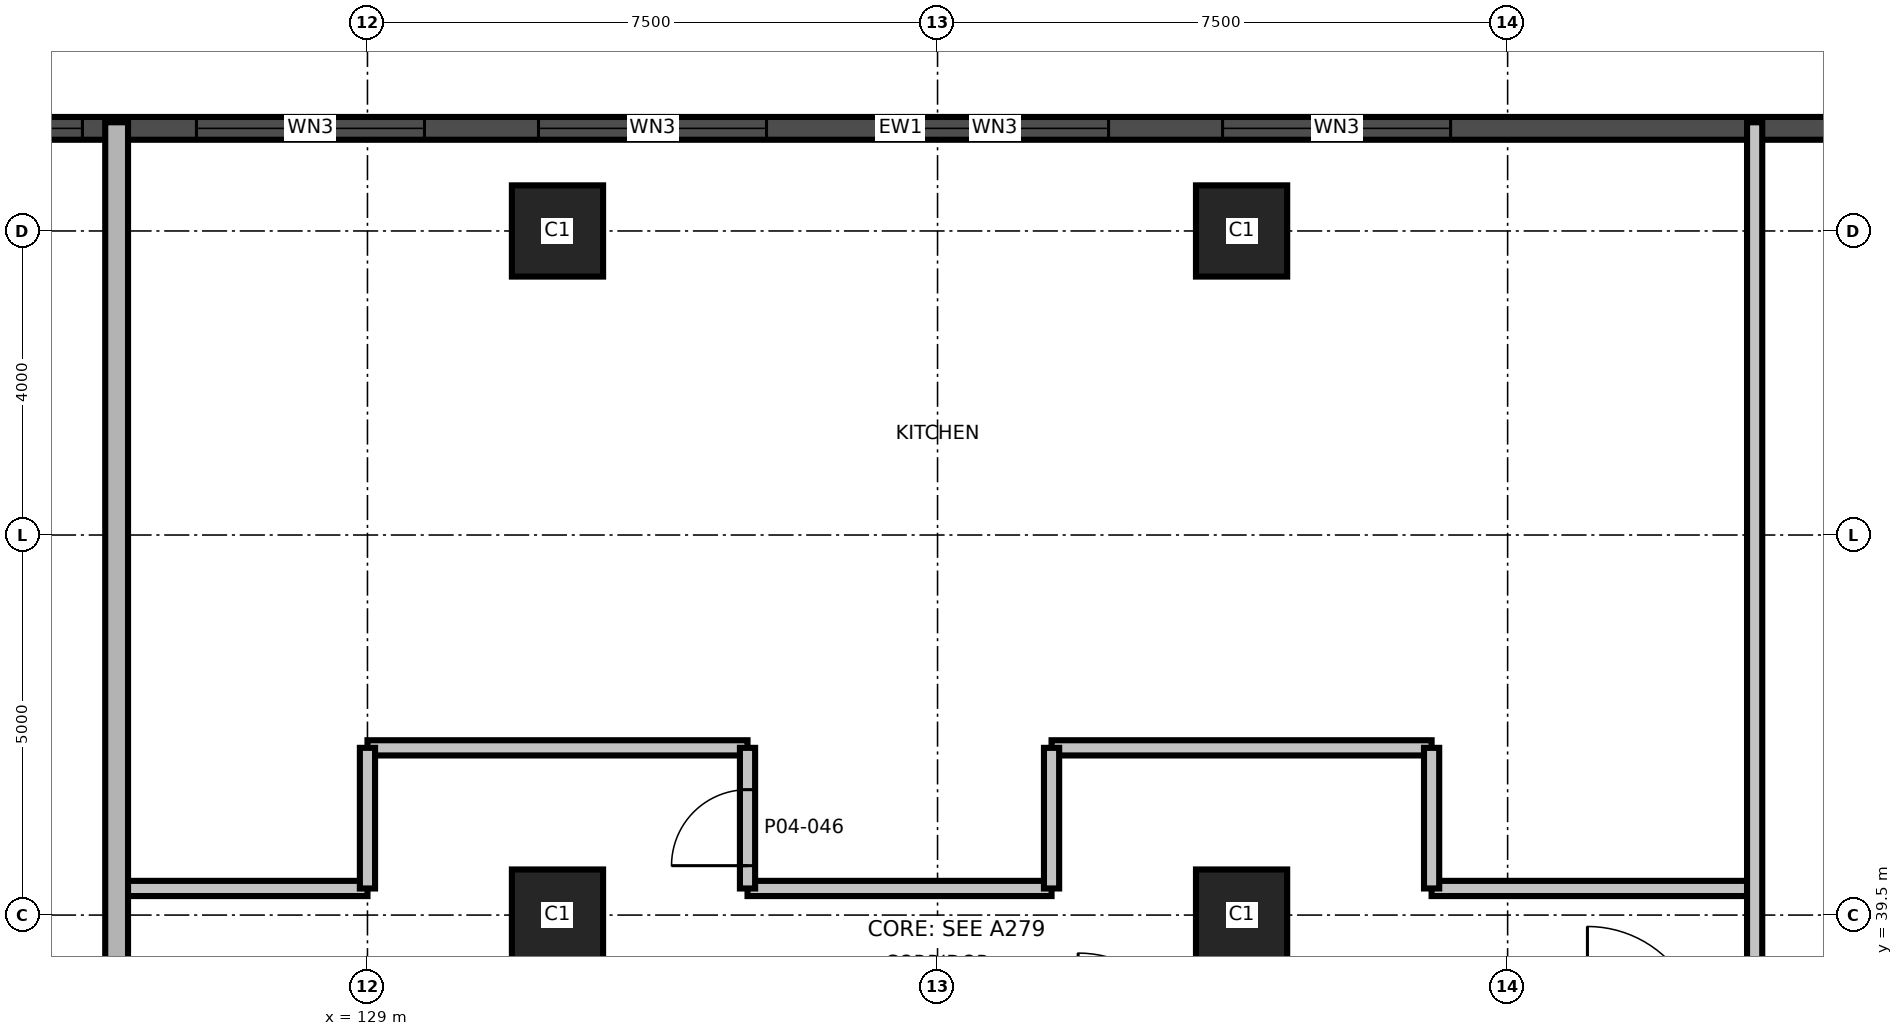
"""IFC4 building model, lengths in metres.
Left out: names, types, materials, properties, quantities, classifications, styles, units other than length and angle.
Written with IfcOpenShell. Run it as: python <this file> out.ifc"""

import sys

from ifc_helpers import new_model, si_unit, direction, frame, frame_2d, origin, origin_2d, place, context, subcontext, project, spatial, rectangle, extrude, element, fill, save


model = new_model("IFC4")
c1 = context("Model", 3, precision=1e-05, world=origin(), true_north=direction((0.0, 1.0)))
c2 = subcontext(c1, "Body", "Model", "MODEL_VIEW")
j1 = project(units=[si_unit("LENGTHUNIT", "METRE"), si_unit("PLANEANGLEUNIT", "RADIAN")], contexts=[c1])
p1 = place(None, origin())
s1 = spatial("IfcSite", under=j1, at=p1, CompositionType="ELEMENT")
p2 = place(p1, origin())
s2 = spatial("IfcBuilding", under=s1, at=p2, CompositionType="ELEMENT")
p3 = place(p2, frame((0.0, 0.0, 23.5)))
s3 = spatial("IfcBuildingStorey", under=s2, at=p3, CompositionType="ELEMENT", Elevation=23.5)
for number, where, z_axis, x_axis in (
    (1, (131.5, 39.5, 0.0), (0.0, 0.0, 1.0), (1.0, 0.0, 0.0)),
    (2, (140.5, 39.5, 0.0), (0.0, 0.0, 1.0), (1.0, 0.0, 0.0)),
    (3, (131.5, 48.5, 0.0), (0.0, 0.0, 1.0), (1.0, 0.0, 0.0)),
    (4, (140.5, 48.5, 0.0), (0.0, 0.0, 1.0), (1.0, 0.0, 0.0)),
):
    element("IfcColumn", number, at=place(p3, frame(where, z_axis=z_axis, x_axis=x_axis)), inside=s3, PredefinedType="COLUMN", context=c2, shape_type="SweptSolid", body=[
        extrude(rectangle(XDim=1.2, YDim=1.2, at=origin_2d()), origin(), (0.0, 0.0, 1.0), 5.0),
    ])
p4 = place(p3, frame((153.952, 49.85, 0.0), z_axis=(0.0, 0.0, 1.0), x_axis=(-1.0, 0.0, 0.0)))
e5 = element("IfcWall", 5, at=p4, inside=s3, PredefinedType="SOLIDWALL", context=c2, shape_type="SweptSolid", body=[
    extrude(rectangle(XDim=35.88, YDim=0.3, at=frame_2d((17.94, 0.0))), origin(), (0.0, 0.0, 1.0), 4.7),
])
p5 = place(p4, frame((1.226, 0.0, 0.9)))
e6 = element("IfcOpeningElement", 6, at=p5, cuts=e5, PredefinedType="OPENING", context=c2, shape_type="SweptSolid", body=[
    extrude(rectangle(XDim=3.0, YDim=2.4, at=frame_2d((1.5, 1.2))), frame((0.0, 0.16, 0.0), z_axis=(0.0, -1.0, 0.0), x_axis=(1.0, 0.0, 0.0)), (0.0, 0.0, 1.0), 0.32),
])
p6 = place(p4, frame((10.702, 0.0, 0.9)))
e7 = element("IfcOpeningElement", 7, at=p6, cuts=e5, PredefinedType="OPENING", context=c2, shape_type="SweptSolid", body=[
    extrude(rectangle(XDim=3.0, YDim=2.4, at=frame_2d((1.5, 1.2))), frame((0.0, 0.16, 0.0), z_axis=(0.0, -1.0, 0.0), x_axis=(1.0, 0.0, 0.0)), (0.0, 0.0, 1.0), 0.32),
])
p7 = place(p4, frame((15.202, 0.0, 0.9)))
e8 = element("IfcOpeningElement", 8, at=p7, cuts=e5, PredefinedType="OPENING", context=c2, shape_type="SweptSolid", body=[
    extrude(rectangle(XDim=3.0, YDim=2.4, at=frame_2d((1.5, 1.2))), frame((0.0, 0.16, 0.0), z_axis=(0.0, -1.0, 0.0), x_axis=(1.0, 0.0, 0.0)), (0.0, 0.0, 1.0), 0.32),
])
p8 = place(p4, frame((19.702, 0.0, 0.9)))
e9 = element("IfcOpeningElement", 9, at=p8, cuts=e5, PredefinedType="OPENING", context=c2, shape_type="SweptSolid", body=[
    extrude(rectangle(XDim=3.0, YDim=2.4, at=frame_2d((1.5, 1.2))), frame((0.0, 0.16, 0.0), z_axis=(0.0, -1.0, 0.0), x_axis=(1.0, 0.0, 0.0)), (0.0, 0.0, 1.0), 0.32),
])
p9 = place(p4, frame((24.202, 0.0, 0.9)))
e10 = element("IfcOpeningElement", 10, at=p9, cuts=e5, PredefinedType="OPENING", context=c2, shape_type="SweptSolid", body=[
    extrude(rectangle(XDim=3.0, YDim=2.4, at=frame_2d((1.5, 1.2))), frame((0.0, 0.16, 0.0), z_axis=(0.0, -1.0, 0.0), x_axis=(1.0, 0.0, 0.0)), (0.0, 0.0, 1.0), 0.32),
])
p10 = place(p4, frame((28.702, 0.0, 0.9)))
e11 = element("IfcOpeningElement", 11, at=p10, cuts=e5, PredefinedType="OPENING", context=c2, shape_type="SweptSolid", body=[
    extrude(rectangle(XDim=3.0, YDim=2.4, at=frame_2d((1.5, 1.2))), frame((0.0, 0.16, 0.0), z_axis=(0.0, -1.0, 0.0), x_axis=(1.0, 0.0, 0.0)), (0.0, 0.0, 1.0), 0.32),
])
p11 = place(p3, frame((125.75, 39.85, 0.0), z_axis=(0.0, 0.0, 1.0), x_axis=(1.0, 0.0, 0.0)))
e12 = element("IfcWall", 12, at=p11, inside=s3, PredefinedType="PARTITIONING", context=c2, shape_type="SweptSolid", body=[
    extrude(rectangle(XDim=3.25, YDim=0.2, at=frame_2d((1.625, 0.0))), origin(), (0.0, 0.0, 1.0), 4.7),
])
p12 = place(p3, frame((134.0, 39.85, 0.0), z_axis=(0.0, 0.0, 1.0), x_axis=(1.0, 0.0, 0.0)))
e13 = element("IfcWall", 13, at=p12, inside=s3, PredefinedType="PARTITIONING", context=c2, shape_type="SweptSolid", body=[
    extrude(rectangle(XDim=4.0, YDim=0.2, at=frame_2d((2.0, 0.0))), origin(), (0.0, 0.0, 1.0), 4.7),
])
p13 = place(p3, frame((143.0, 39.85, 0.0), z_axis=(0.0, 0.0, 1.0), x_axis=(1.0, 0.0, 0.0)))
e14 = element("IfcWall", 14, at=p13, inside=s3, PredefinedType="PARTITIONING", context=c2, shape_type="SweptSolid", body=[
    extrude(rectangle(XDim=4.25, YDim=0.2, at=frame_2d((2.125, 0.0))), origin(), (0.0, 0.0, 1.0), 4.7),
])
for number, where, z_axis, x_axis in (
    (15, (129.0, 41.7, 0.0), (0.0, 0.0, 1.0), (1.0, 0.0, 0.0)),
    (16, (138.0, 41.7, 0.0), (0.0, 0.0, 1.0), (1.0, 0.0, 0.0)),
):
    element("IfcWall", number, at=place(p3, frame(where, z_axis=z_axis, x_axis=x_axis)), inside=s3, PredefinedType="PARTITIONING", context=c2, shape_type="SweptSolid", body=[
        extrude(rectangle(XDim=5.0, YDim=0.2, at=frame_2d((2.5, 0.0))), origin(), (0.0, 0.0, 1.0), 4.7),
    ])
p14 = place(p3, frame((125.7, 11.07, 0.0), z_axis=(0.0, 0.0, 1.0), x_axis=(0.0, 1.0, 0.0)))
e17 = element("IfcWall", 17, at=p14, inside=s3, PredefinedType="SHEAR", context=c2, shape_type="SweptSolid", body=[
    extrude(rectangle(XDim=38.86, YDim=0.3, at=frame_2d((19.43, 0.0))), origin(), (0.0, 0.0, 1.0), 4.7),
])
p15 = place(p14, frame((24.73, 0.0, 0.0)))
e18 = element("IfcOpeningElement", 18, at=p15, cuts=e17, PredefinedType="OPENING", context=c2, shape_type="SweptSolid", body=[
    extrude(rectangle(XDim=1.2, YDim=2.1, at=frame_2d((0.6, 1.05))), frame((0.0, 0.16, 0.0), z_axis=(0.0, -1.0, 0.0), x_axis=(1.0, 0.0, 0.0)), (0.0, 0.0, 1.0), 0.32),
])
p16 = place(p3, frame((129.0, 39.85, 0.0), z_axis=(0.0, 0.0, 1.0), x_axis=(0.0, 1.0, 0.0)))
e19 = element("IfcWall", 19, at=p16, inside=s3, PredefinedType="PARTITIONING", context=c2, shape_type="SweptSolid", body=[
    extrude(rectangle(XDim=1.85, YDim=0.2, at=frame_2d((0.925, 0.0))), origin(), (0.0, 0.0, 1.0), 4.7),
])
p17 = place(p3, frame((134.0, 39.85, 0.0), z_axis=(0.0, 0.0, 1.0), x_axis=(0.0, 1.0, 0.0)))
e20 = element("IfcWall", 20, at=p17, inside=s3, PredefinedType="PARTITIONING", context=c2, shape_type="SweptSolid", body=[
    extrude(rectangle(XDim=1.85, YDim=0.2, at=frame_2d((0.925, 0.0))), origin(), (0.0, 0.0, 1.0), 4.7),
])
p18 = place(p17, frame((0.3, 0.0, 0.0)))
e21 = element("IfcOpeningElement", 21, at=p18, cuts=e20, PredefinedType="OPENING", context=c2, shape_type="SweptSolid", body=[
    extrude(rectangle(XDim=1.0, YDim=2.1, at=frame_2d((0.5, 1.05))), frame((0.0, 0.11, 0.0), z_axis=(0.0, -1.0, 0.0), x_axis=(1.0, 0.0, 0.0)), (0.0, 0.0, 1.0), 0.22),
])
for number, where, z_axis, x_axis in (
    (22, (138.0, 39.85, 0.0), (0.0, 0.0, 1.0), (0.0, 1.0, 0.0)),
    (23, (143.0, 39.85, 0.0), (0.0, 0.0, 1.0), (0.0, 1.0, 0.0)),
):
    element("IfcWall", number, at=place(p3, frame(where, z_axis=z_axis, x_axis=x_axis)), inside=s3, PredefinedType="PARTITIONING", context=c2, shape_type="SweptSolid", body=[
        extrude(rectangle(XDim=1.85, YDim=0.2, at=frame_2d((0.925, 0.0))), origin(), (0.0, 0.0, 1.0), 4.7),
    ])
p19 = place(p3, frame((147.25, 11.07, 0.0), z_axis=(0.0, 0.0, 1.0), x_axis=(0.0, 1.0, 0.0)))
e24 = element("IfcWall", 24, at=p19, inside=s3, PredefinedType="PARTITIONING", context=c2, shape_type="SweptSolid", body=[
    extrude(rectangle(XDim=38.86, YDim=0.2, at=frame_2d((19.43, 0.0))), origin(), (0.0, 0.0, 1.0), 4.7),
])
p20 = place(p19, frame((18.18, 0.0, 0.0)))
e25 = element("IfcOpeningElement", 25, at=p20, cuts=e24, PredefinedType="OPENING", context=c2, shape_type="SweptSolid", body=[
    extrude(rectangle(XDim=1.5, YDim=2.1, at=frame_2d((0.75, 1.05))), frame((0.0, 0.11, 0.0), z_axis=(0.0, -1.0, 0.0), x_axis=(1.0, 0.0, 0.0)), (0.0, 0.0, 1.0), 0.22),
])
p21 = place(p6, origin())
e26 = element("IfcWindow", 26, at=p21, inside=s3, PartitioningType="SINGLE_PANEL", PredefinedType="WINDOW", context=c2, shape_type="SweptSolid", body=[
    extrude(rectangle(XDim=3.0, YDim=2.4, at=frame_2d((1.5, 1.2))), frame((0.0, 0.03, 0.0), z_axis=(0.0, -1.0, 0.0), x_axis=(1.0, 0.0, 0.0)), (0.0, 0.0, 1.0), 0.06),
])
fill(e7, e26)
p22 = place(p7, origin())
e27 = element("IfcWindow", 27, at=p22, inside=s3, PartitioningType="SINGLE_PANEL", PredefinedType="WINDOW", context=c2, shape_type="SweptSolid", body=[
    extrude(rectangle(XDim=3.0, YDim=2.4, at=frame_2d((1.5, 1.2))), frame((0.0, 0.03, 0.0), z_axis=(0.0, -1.0, 0.0), x_axis=(1.0, 0.0, 0.0)), (0.0, 0.0, 1.0), 0.06),
])
fill(e8, e27)
p23 = place(p8, origin())
e28 = element("IfcWindow", 28, at=p23, inside=s3, PartitioningType="SINGLE_PANEL", PredefinedType="WINDOW", context=c2, shape_type="SweptSolid", body=[
    extrude(rectangle(XDim=3.0, YDim=2.4, at=frame_2d((1.5, 1.2))), frame((0.0, 0.03, 0.0), z_axis=(0.0, -1.0, 0.0), x_axis=(1.0, 0.0, 0.0)), (0.0, 0.0, 1.0), 0.06),
])
fill(e9, e28)
p24 = place(p9, origin())
e29 = element("IfcWindow", 29, at=p24, inside=s3, PartitioningType="SINGLE_PANEL", PredefinedType="WINDOW", context=c2, shape_type="SweptSolid", body=[
    extrude(rectangle(XDim=3.0, YDim=2.4, at=frame_2d((1.5, 1.2))), frame((0.0, 0.03, 0.0), z_axis=(0.0, -1.0, 0.0), x_axis=(1.0, 0.0, 0.0)), (0.0, 0.0, 1.0), 0.06),
])
fill(e10, e29)
p25 = place(p10, origin())
e30 = element("IfcWindow", 30, at=p25, inside=s3, PartitioningType="SINGLE_PANEL", PredefinedType="WINDOW", context=c2, shape_type="SweptSolid", body=[
    extrude(rectangle(XDim=3.0, YDim=2.4, at=frame_2d((1.5, 1.2))), frame((0.0, 0.03, 0.0), z_axis=(0.0, -1.0, 0.0), x_axis=(1.0, 0.0, 0.0)), (0.0, 0.0, 1.0), 0.06),
])
fill(e11, e30)
p26 = place(p18, origin())
e31 = element("IfcDoor", 31, at=p26, inside=s3, OperationType="SINGLE_SWING_RIGHT", PredefinedType="DOOR", context=c2, shape_type="SweptSolid", body=[
    extrude(rectangle(XDim=1.0, YDim=2.1, at=frame_2d((0.5, 1.05))), frame((0.0, 0.025, 0.0), z_axis=(0.0, -1.0, 0.0), x_axis=(1.0, 0.0, 0.0)), (0.0, 0.0, 1.0), 0.05),
])
fill(e21, e31)
save(model, sys.argv[1])
